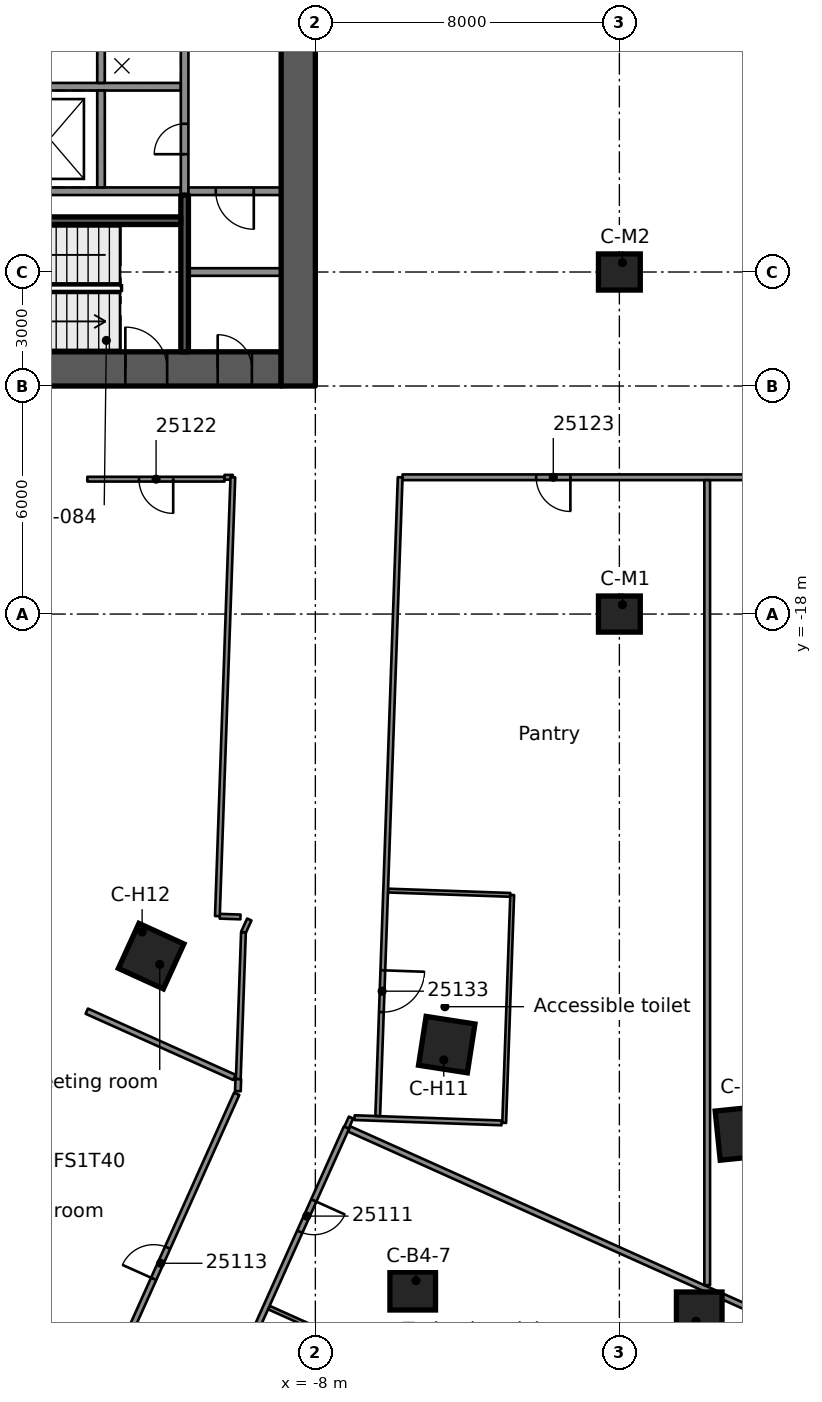
"""IFC4 building model, lengths in metres.
Left out: names, types, materials, properties, quantities, classifications, styles, units other than length and angle.
Written with IfcOpenShell. Run it as: python <this file> out.ifc"""

import sys

from ifc_helpers import new_model, si_unit, direction, frame, frame_2d, origin, origin_2d, place, context, subcontext, project, spatial, rectangle, extrude, element, fill, save


model = new_model("IFC4")
c1 = context("Model", 3, precision=1e-05, world=origin(), true_north=direction((0.0, 1.0)))
c2 = subcontext(c1, "Body", "Model", "MODEL_VIEW")
j1 = project(units=[si_unit("LENGTHUNIT", "METRE"), si_unit("PLANEANGLEUNIT", "RADIAN")], contexts=[c1])
p1 = place(None, origin())
s1 = spatial("IfcSite", under=j1, at=p1, CompositionType="ELEMENT")
p2 = place(p1, origin())
s2 = spatial("IfcBuilding", under=s1, at=p2, CompositionType="ELEMENT")
p3 = place(p2, frame((0.0, 0.0, 127.2)))
s3 = spatial("IfcBuildingStorey", under=s2, at=p3, CompositionType="ELEMENT", Elevation=127.2)
p4 = place(p3, frame((-18.1, -11.55, 0.0), z_axis=(0.0, 0.0, 1.0), x_axis=(1.0, 0.0, 0.0)))
e1 = element("IfcWall", 1, at=p4, inside=s3, PredefinedType="SHEAR", context=c2, shape_type="SweptSolid", body=[
    extrude(rectangle(XDim=9.2, YDim=0.9, at=frame_2d((4.6, 0.0))), origin(), (0.0, 0.0, 1.0), 3.5),
])
p5 = place(p4, frame((5.1, 0.0, 0.0)))
e2 = element("IfcOpeningElement", 2, at=p5, cuts=e1, PredefinedType="OPENING", context=c2, shape_type="SweptSolid", body=[
    extrude(rectangle(XDim=1.1, YDim=2.1, at=frame_2d((0.55, 1.05))), frame((0.0, 0.46, 0.0), z_axis=(0.0, -1.0, 0.0), x_axis=(1.0, 0.0, 0.0)), (0.0, 0.0, 1.0), 0.92),
])
p6 = place(p4, frame((7.53, 0.0, 0.0)))
e3 = element("IfcOpeningElement", 3, at=p6, cuts=e1, PredefinedType="OPENING", context=c2, shape_type="SweptSolid", body=[
    extrude(rectangle(XDim=0.9, YDim=2.1, at=frame_2d((0.45, 1.05))), frame((0.0, 0.46, 0.0), z_axis=(0.0, -1.0, 0.0), x_axis=(1.0, 0.0, 0.0)), (0.0, 0.0, 1.0), 0.92),
])
p7 = place(p3, frame((-8.45, -12.0, 0.0), z_axis=(0.0, 0.0, 1.0), x_axis=(0.0, 1.0, 0.0)))
e4 = element("IfcWall", 4, at=p7, inside=s3, PredefinedType="SHEAR", context=c2, shape_type="SweptSolid", body=[
    extrude(rectangle(XDim=24.0, YDim=0.9, at=frame_2d((12.0, 0.0))), origin(), (0.0, 0.0, 1.0), 3.5),
])
p8 = place(p7, frame((9.6, 0.0, 0.0)))
e5 = element("IfcOpeningElement", 5, at=p8, cuts=e4, PredefinedType="OPENING", context=c2, shape_type="SweptSolid", body=[
    extrude(rectangle(XDim=1.8, YDim=2.1, at=frame_2d((0.9, 1.05))), frame((0.0, 0.46, 0.0), z_axis=(0.0, -1.0, 0.0), x_axis=(1.0, 0.0, 0.0)), (0.0, 0.0, 1.0), 0.92),
])
p9 = place(p7, frame((19.65, 0.0, 0.0)))
e6 = element("IfcOpeningElement", 6, at=p9, cuts=e4, PredefinedType="OPENING", context=c2, shape_type="SweptSolid", body=[
    extrude(rectangle(XDim=1.1, YDim=2.1, at=frame_2d((0.55, 1.05))), frame((0.0, 0.46, 0.0), z_axis=(0.0, -1.0, 0.0), x_axis=(1.0, 0.0, 0.0)), (0.0, 0.0, 1.0), 0.92),
])
for number, where, z_axis, x_axis in (
    (7, (-5.438, -35.812, 0.0), (0.0, 0.0, 1.0), (1.0, 0.0, 0.0)),
    (8, (2.101, -36.338, 0.0), (0.0, 0.0, 1.0), (1.0, 0.0, 0.0)),
):
    element("IfcColumn", number, at=place(p3, frame(where, z_axis=z_axis, x_axis=x_axis)), inside=s3, PredefinedType="COLUMN", context=c2, shape_type="SweptSolid", body=[
        extrude(rectangle(XDim=1.2, YDim=1.0, at=origin_2d()), origin(), (0.0, 0.0, 1.0), 3.5),
    ])
for number, where, z_axis, x_axis in (
    (9, (3.234, -31.658, 0.0), (0.0, 0.0, 1.0), (0.102, -0.995, 0.0)),
    (10, (-4.543, -29.329, 0.0), (0.0, 0.0, 1.0), (-0.153, -0.988, 0.0)),
    (11, (-12.321, -27.001, 0.0), (0.0, 0.0, 1.0), (-0.415, -0.91, 0.0)),
):
    element("IfcColumn", number, at=place(p3, frame(where, z_axis=z_axis, x_axis=x_axis)), inside=s3, PredefinedType="COLUMN", context=c2, shape_type="SweptSolid", body=[
        extrude(rectangle(XDim=1.3, YDim=1.3, at=origin_2d()), origin(), (0.0, 0.0, 1.0), 3.5),
    ])
for number, where, z_axis, x_axis in (
    (12, (0.0, -18.0, 0.0), (0.0, 0.0, 1.0), (1.0, 0.0, 0.0)),
    (13, (0.0, -9.0, 0.0), (0.0, 0.0, 1.0), (1.0, 0.0, 0.0)),
):
    element("IfcColumn", number, at=place(p3, frame(where, z_axis=z_axis, x_axis=x_axis)), inside=s3, PredefinedType="COLUMN", context=c2, shape_type="SweptSolid", body=[
        extrude(rectangle(XDim=1.1, YDim=0.95, at=origin_2d()), origin(), (0.0, 0.0, 1.0), 3.5),
    ])
p10 = place(p3, frame((-11.54, -6.875, 0.0), z_axis=(0.0, 0.0, 1.0), x_axis=(-1.0, 0.0, 0.0)))
e14 = element("IfcWall", 14, at=p10, inside=s3, PredefinedType="SOLIDWALL", context=c2, shape_type="SweptSolid", body=[
    extrude(rectangle(XDim=6.56, YDim=0.2, at=frame_2d((3.28, 0.0))), origin(), (0.0, 0.0, 1.0), 3.09),
])
p11 = place(p3, frame((-11.54, -4.125, 0.0), z_axis=(0.0, 0.0, 1.0), x_axis=(-1.0, 0.0, 0.0)))
e15 = element("IfcWall", 15, at=p11, inside=s3, PredefinedType="SOLIDWALL", context=c2, shape_type="SweptSolid", body=[
    extrude(rectangle(XDim=4.7, YDim=0.2, at=frame_2d((2.35, 0.0))), origin(), (0.0, 0.0, 1.0), 3.09),
])
p12 = place(p3, frame((-11.44, -6.975, 0.0), z_axis=(0.0, 0.0, 1.0), x_axis=(0.0, 1.0, 0.0)))
e16 = element("IfcWall", 16, at=p12, inside=s3, PredefinedType="SOLIDWALL", context=c2, shape_type="SweptSolid", body=[
    extrude(rectangle(XDim=13.95, YDim=0.2, at=frame_2d((6.975, 0.0))), origin(), (0.0, 0.0, 1.0), 3.09),
])
p13 = place(p12, frame((6.425, 0.0, 0.0)))
e17 = element("IfcOpeningElement", 17, at=p13, cuts=e16, PredefinedType="OPENING", context=c2, shape_type="SweptSolid", body=[
    extrude(rectangle(XDim=1.1, YDim=2.1, at=frame_2d((0.55, 1.05))), frame((0.0, 0.11, 0.0), z_axis=(0.0, -1.0, 0.0), x_axis=(1.0, 0.0, 0.0)), (0.0, 0.0, 1.0), 0.22),
])
p14 = place(p12, frame((9.175, 0.0, 0.0)))
e18 = element("IfcOpeningElement", 18, at=p14, cuts=e16, PredefinedType="OPENING", context=c2, shape_type="SweptSolid", body=[
    extrude(rectangle(XDim=1.1, YDim=2.1, at=frame_2d((0.55, 1.05))), frame((0.0, 0.11, 0.0), z_axis=(0.0, -1.0, 0.0), x_axis=(1.0, 0.0, 0.0)), (0.0, 0.0, 1.0), 0.22),
])
p15 = place(p12, frame((11.925, 0.0, 0.0)))
e19 = element("IfcOpeningElement", 19, at=p15, cuts=e16, PredefinedType="OPENING", context=c2, shape_type="SweptSolid", body=[
    extrude(rectangle(XDim=1.1, YDim=2.1, at=frame_2d((0.55, 1.05))), frame((0.0, 0.11, 0.0), z_axis=(0.0, -1.0, 0.0), x_axis=(1.0, 0.0, 0.0)), (0.0, 0.0, 1.0), 0.22),
])
p16 = place(p12, frame((1.075, 0.0, 0.0)))
e20 = element("IfcOpeningElement", 20, at=p16, cuts=e16, PredefinedType="OPENING", context=c2, shape_type="SweptSolid", body=[
    extrude(rectangle(XDim=0.8, YDim=2.1, at=frame_2d((0.4, 1.05))), frame((0.0, 0.11, 0.0), z_axis=(0.0, -1.0, 0.0), x_axis=(1.0, 0.0, 0.0)), (0.0, 0.0, 1.0), 0.22),
])
for number, where, z_axis, x_axis in (
    (21, (-13.64, -6.775, 0.0), (0.0, 0.0, 1.0), (0.0, 1.0, 0.0)),
    (22, (-13.64, -4.025, 0.0), (0.0, 0.0, 1.0), (0.0, 1.0, 0.0)),
):
    element("IfcWall", number, at=place(p3, frame(where, z_axis=z_axis, x_axis=x_axis)), inside=s3, PredefinedType="SOLIDWALL", context=c2, shape_type="SweptSolid", body=[
        extrude(rectangle(XDim=2.55, YDim=0.2, at=frame_2d((1.275, 0.0))), origin(), (0.0, 0.0, 1.0), 3.09),
    ])
p17 = place(p3, frame((-11.44, -11.1, 0.0), z_axis=(0.0, 0.0, 1.0), x_axis=(0.0, 1.0, 0.0)))
e23 = element("IfcWall", 23, at=p17, inside=s3, PredefinedType="SOLIDWALL", context=c2, shape_type="SweptSolid", body=[
    extrude(rectangle(XDim=4.125, YDim=0.2, at=frame_2d((2.062, 0.0))), origin(), (0.0, 0.0, 1.0), 3.09),
])
p18 = place(p3, frame((-11.54, -7.65, 0.0), z_axis=(0.0, 0.0, 1.0), x_axis=(-1.0, 0.0, 0.0)))
e24 = element("IfcWall", 24, at=p18, inside=s3, PredefinedType="SOLIDWALL", context=c2, shape_type="SweptSolid", body=[
    extrude(rectangle(XDim=6.56, YDim=0.2, at=frame_2d((3.28, 0.0))), origin(), (0.0, 0.0, 1.0), 3.09),
])
p19 = place(p3, frame((-8.9, -6.875, 0.0), z_axis=(0.0, 0.0, 1.0), x_axis=(-1.0, 0.0, 0.0)))
e25 = element("IfcWall", 25, at=p19, inside=s3, PredefinedType="PARTITIONING", context=c2, shape_type="SweptSolid", body=[
    extrude(rectangle(XDim=2.44, YDim=0.2, at=frame_2d((1.22, 0.0))), origin(), (0.0, 0.0, 1.0), 3.09),
])
p20 = place(p19, frame((0.72, 0.0, 0.0)))
e26 = element("IfcOpeningElement", 26, at=p20, cuts=e25, PredefinedType="OPENING", context=c2, shape_type="SweptSolid", body=[
    extrude(rectangle(XDim=1.0, YDim=2.1, at=frame_2d((0.5, 1.05))), frame((0.0, 0.11, 0.0), z_axis=(0.0, -1.0, 0.0), x_axis=(1.0, 0.0, 0.0)), (0.0, 0.0, 1.0), 0.22),
])
p21 = place(p3, frame((-8.9, -9.0, 0.0), z_axis=(0.0, 0.0, 1.0), x_axis=(-1.0, 0.0, 0.0)))
e27 = element("IfcWall", 27, at=p21, inside=s3, PredefinedType="PARTITIONING", context=c2, shape_type="SweptSolid", body=[
    extrude(rectangle(XDim=2.44, YDim=0.2, at=frame_2d((1.22, 0.0))), origin(), (0.0, 0.0, 1.0), 3.09),
])
p22 = place(p3, frame((-9.223, -36.248, 0.0), z_axis=(0.0, 0.0, 1.0), x_axis=(0.912391093054, -0.409319549149, 0.0)))
e28 = element("IfcWall", 28, at=p22, inside=s3, PredefinedType="PARTITIONING", context=c2, shape_type="SweptSolid", body=[
    extrude(rectangle(XDim=13.825, YDim=0.1, at=frame_2d((6.913, 0.0))), origin(), (0.0, 0.0, 1.0), 3.08),
])
p23 = place(p3, frame((-14.015, -28.449, 0.0), z_axis=(0.0, 0.0, 1.0), x_axis=(0.912389731209, -0.409322584748, 0.0)))
e29 = element("IfcWall", 29, at=p23, inside=s3, PredefinedType="PARTITIONING", context=c2, shape_type="SweptSolid", body=[
    extrude(rectangle(XDim=4.258, YDim=0.15, at=frame_2d((2.129, 0.0))), origin(), (0.0, 0.0, 1.0), 3.08),
])
p24 = place(p3, frame((-7.113, -31.546, 0.0), z_axis=(0.0, 0.0, 1.0), x_axis=(0.912346277005, -0.409419431432, 0.0)))
e30 = element("IfcWall", 30, at=p24, inside=s3, PredefinedType="PARTITIONING", context=c2, shape_type="SweptSolid", body=[
    extrude(rectangle(XDim=13.825, YDim=0.15, at=frame_2d((6.913, 0.0))), origin(), (0.0, 0.0, 1.0), 3.08),
])
p25 = place(p3, frame((-6.968, -31.251, 0.0), z_axis=(0.0, 0.0, 1.0), x_axis=(0.99936470119, -0.035639781365, 0.0)))
e31 = element("IfcWall", 31, at=p25, inside=s3, PredefinedType="PARTITIONING", context=c2, shape_type="SweptSolid", body=[
    extrude(rectangle(XDim=3.87, YDim=0.125, at=frame_2d((1.935, 0.0))), origin(), (0.0, 0.0, 1.0), 3.08),
])
p26 = place(p3, frame((-10.515, -25.951, 0.0), z_axis=(0.0, 0.0, 1.0), x_axis=(0.999387748514, -0.034987542363, 0.0)))
e32 = element("IfcWall", 32, at=p26, inside=s3, PredefinedType="PARTITIONING", context=c2, shape_type="SweptSolid", body=[
    extrude(rectangle(XDim=0.544, YDim=0.125, at=frame_2d((0.272, 0.0))), origin(), (0.0, 0.0, 1.0), 3.08),
])
p27 = place(p3, frame((-6.088, -25.276, 0.0), z_axis=(0.0, 0.0, 1.0), x_axis=(0.999383173756, -0.035117972788, 0.0)))
e33 = element("IfcWall", 33, at=p27, inside=s3, PredefinedType="PARTITIONING", context=c2, shape_type="SweptSolid", body=[
    extrude(rectangle(XDim=3.219, YDim=0.1, at=frame_2d((1.609, 0.0))), origin(), (0.0, 0.0, 1.0), 3.08),
])
p28 = place(p3, frame((-10.391, -14.451, 0.0), z_axis=(0.0, 0.0, 1.0), x_axis=(-1.0, 0.0, 0.0)))
e34 = element("IfcWall", 34, at=p28, inside=s3, PredefinedType="PARTITIONING", context=c2, shape_type="SweptSolid", body=[
    extrude(rectangle(XDim=3.609, YDim=0.125, at=frame_2d((1.804, 0.0))), origin(), (0.0, 0.0, 1.0), 3.08),
])
p29 = place(p28, frame((1.35, 0.0, 0.0)))
e35 = element("IfcOpeningElement", 35, at=p29, cuts=e34, PredefinedType="OPENING", context=c2, shape_type="SweptSolid", body=[
    extrude(rectangle(XDim=0.9, YDim=2.1, at=frame_2d((0.45, 1.05))), frame((0.0, 0.073, 0.0), z_axis=(0.0, -1.0, 0.0), x_axis=(1.0, 0.0, 0.0)), (0.0, 0.0, 1.0), 0.145),
])
p30 = place(p3, frame((-10.39, -14.401, 0.0), z_axis=(0.0, 0.0, 1.0), x_axis=(1.0, 0.0, 0.0)))
e36 = element("IfcWall", 36, at=p30, inside=s3, PredefinedType="PARTITIONING", context=c2, shape_type="SweptSolid", body=[
    extrude(rectangle(XDim=0.219, YDim=0.125, at=frame_2d((0.109, 0.0))), origin(), (0.0, 0.0, 1.0), 3.08),
])
p31 = place(p3, frame((10.391, -14.401, 0.0), z_axis=(0.0, 0.0, 1.0), x_axis=(-1.0, 0.0, 0.0)))
e37 = element("IfcWall", 37, at=p31, inside=s3, PredefinedType="PARTITIONING", context=c2, shape_type="SweptSolid", body=[
    extrude(rectangle(XDim=16.096, YDim=0.15, at=frame_2d((8.048, 0.0))), origin(), (0.0, 0.0, 1.0), 3.08),
])
p32 = place(p31, frame((11.68, 0.0, 0.0)))
e38 = element("IfcOpeningElement", 38, at=p32, cuts=e37, PredefinedType="OPENING", context=c2, shape_type="SweptSolid", body=[
    extrude(rectangle(XDim=0.9, YDim=2.1, at=frame_2d((0.45, 1.05))), frame((0.0, 0.085, 0.0), z_axis=(0.0, -1.0, 0.0), x_axis=(1.0, 0.0, 0.0)), (0.0, 0.0, 1.0), 0.17),
])
p33 = place(p31, frame((3.6, 0.0, 0.0)))
e39 = element("IfcOpeningElement", 39, at=p33, cuts=e37, PredefinedType="OPENING", context=c2, shape_type="SweptSolid", body=[
    extrude(rectangle(XDim=0.9, YDim=2.1, at=frame_2d((0.45, 1.05))), frame((0.0, 0.085, 0.0), z_axis=(0.0, -1.0, 0.0), x_axis=(1.0, 0.0, 0.0)), (0.0, 0.0, 1.0), 0.17),
])
p34 = place(p3, frame((-9.892, -26.374, 0.0), z_axis=(0.0, 0.0, 1.0), x_axis=(0.415837630043, 0.909438873944, 0.0)))
e40 = element("IfcWall", 40, at=p34, inside=s3, PredefinedType="PARTITIONING", context=c2, shape_type="SweptSolid", body=[
    extrude(rectangle(XDim=0.37, YDim=0.125, at=frame_2d((0.185, 0.0))), origin(), (0.0, 0.0, 1.0), 3.08),
])
p35 = place(p3, frame((-7.181, -31.515, 0.0), z_axis=(0.0, 0.0, 1.0), x_axis=(0.409774665578, 0.912186781011, 0.0)))
e41 = element("IfcWall", 41, at=p35, inside=s3, PredefinedType="PARTITIONING", context=c2, shape_type="SweptSolid", body=[
    extrude(rectangle(XDim=0.292, YDim=0.125, at=frame_2d((0.146, 0.0))), origin(), (0.0, 0.0, 1.0), 3.08),
])
p36 = place(p3, frame((-7.182, -31.514, 0.0), z_axis=(0.0, 0.0, 1.0), x_axis=(-0.409349192906, -0.912377793607, 0.0)))
e42 = element("IfcWall", 42, at=p36, inside=s3, PredefinedType="PARTITIONING", context=c2, shape_type="SweptSolid", body=[
    extrude(rectangle(XDim=24.808, YDim=0.15, at=frame_2d((12.404, 0.0))), origin(), (0.0, 0.0, 1.0), 3.08),
])
p37 = place(p36, frame((2.101, 0.0, 0.0)))
e43 = element("IfcOpeningElement", 43, at=p37, cuts=e42, PredefinedType="OPENING", context=c2, shape_type="SweptSolid", body=[
    extrude(rectangle(XDim=0.9, YDim=2.1, at=frame_2d((0.45, 1.05))), frame((0.0, 0.085, 0.0), z_axis=(0.0, -1.0, 0.0), x_axis=(1.0, 0.0, 0.0)), (0.0, 0.0, 1.0), 0.17),
])
p38 = place(p36, frame((7.254, 0.0, 0.0)))
e44 = element("IfcOpeningElement", 44, at=p38, cuts=e42, PredefinedType="OPENING", context=c2, shape_type="SweptSolid", body=[
    extrude(rectangle(XDim=0.9, YDim=2.1, at=frame_2d((0.45, 1.05))), frame((0.0, 0.085, 0.0), z_axis=(0.0, -1.0, 0.0), x_axis=(1.0, 0.0, 0.0)), (0.0, 0.0, 1.0), 0.17),
])
p39 = place(p36, frame((13.408, 0.0, 0.0)))
e45 = element("IfcOpeningElement", 45, at=p39, cuts=e42, PredefinedType="OPENING", context=c2, shape_type="SweptSolid", body=[
    extrude(rectangle(XDim=0.9, YDim=2.1, at=frame_2d((0.45, 1.05))), frame((0.0, 0.085, 0.0), z_axis=(0.0, -1.0, 0.0), x_axis=(1.0, 0.0, 0.0)), (0.0, 0.0, 1.0), 0.17),
])
p40 = place(p3, frame((-18.846, -50.182, 0.0), z_axis=(0.0, 0.0, 1.0), x_axis=(0.409371431607, 0.912367815622, 0.0)))
e46 = element("IfcWall", 46, at=p40, inside=s3, PredefinedType="PARTITIONING", context=c2, shape_type="SweptSolid", body=[
    extrude(rectangle(XDim=21.438, YDim=0.15, at=frame_2d((10.719, 0.0))), origin(), (0.0, 0.0, 1.0), 3.08),
])
p41 = place(p40, frame((16.1, 0.0, 0.0)))
e47 = element("IfcOpeningElement", 47, at=p41, cuts=e46, PredefinedType="OPENING", context=c2, shape_type="SweptSolid", body=[
    extrude(rectangle(XDim=0.9, YDim=2.1, at=frame_2d((0.45, 1.05))), frame((0.0, 0.085, 0.0), z_axis=(0.0, -1.0, 0.0), x_axis=(1.0, 0.0, 0.0)), (0.0, 0.0, 1.0), 0.17),
])
p42 = place(p40, frame((5.35, 0.0, 0.0)))
e48 = element("IfcOpeningElement", 48, at=p42, cuts=e46, PredefinedType="OPENING", context=c2, shape_type="SweptSolid", body=[
    extrude(rectangle(XDim=0.9, YDim=2.1, at=frame_2d((0.45, 1.05))), frame((0.0, 0.085, 0.0), z_axis=(0.0, -1.0, 0.0), x_axis=(1.0, 0.0, 0.0)), (0.0, 0.0, 1.0), 0.17),
])
p43 = place(p3, frame((-3.031, -31.388, 0.0), z_axis=(0.0, 0.0, 1.0), x_axis=(0.035158834676, 0.999381737048, 0.0)))
e49 = element("IfcWall", 49, at=p43, inside=s3, PredefinedType="PARTITIONING", context=c2, shape_type="SweptSolid", body=[
    extrude(rectangle(XDim=6.0, YDim=0.1, at=frame_2d((3.0, 0.0))), origin(), (0.0, 0.0, 1.0), 3.08),
])
p44 = place(p3, frame((-5.768, -14.401, 0.0), z_axis=(0.0, 0.0, 1.0), x_axis=(-0.035129220635, -0.999382778448, 0.0)))
e50 = element("IfcWall", 50, at=p44, inside=s3, PredefinedType="PARTITIONING", context=c2, shape_type="SweptSolid", body=[
    extrude(rectangle(XDim=16.819, YDim=0.125, at=frame_2d((8.409, 0.0))), origin(), (0.0, 0.0, 1.0), 3.08),
])
p45 = place(p44, frame((12.981, 0.0, 0.0)))
e51 = element("IfcOpeningElement", 51, at=p45, cuts=e50, PredefinedType="OPENING", context=c2, shape_type="SweptSolid", body=[
    extrude(rectangle(XDim=1.1, YDim=2.1, at=frame_2d((0.55, 1.05))), frame((0.0, 0.073, 0.0), z_axis=(0.0, -1.0, 0.0), x_axis=(1.0, 0.0, 0.0)), (0.0, 0.0, 1.0), 0.145),
])
p46 = place(p3, frame((-10.028, -30.238, 0.0), z_axis=(0.0, 0.0, 1.0), x_axis=(0.03517125066, 0.999381300169, 0.0)))
e52 = element("IfcWall", 52, at=p46, inside=s3, PredefinedType="PARTITIONING", context=c2, shape_type="SweptSolid", body=[
    extrude(rectangle(XDim=3.866, YDim=0.125, at=frame_2d((1.933, 0.0))), origin(), (0.0, 0.0, 1.0), 3.08),
])
p47 = place(p3, frame((-10.039, -30.555, 0.0), z_axis=(0.0, 0.0, 1.0), x_axis=(0.034647905353, 0.999399581076, 0.0)))
e53 = element("IfcWall", 53, at=p47, inside=s3, PredefinedType="PARTITIONING", context=c2, shape_type="SweptSolid", body=[
    extrude(rectangle(XDim=0.317, YDim=0.15, at=frame_2d((0.159, 0.0))), origin(), (0.0, 0.0, 1.0), 3.08),
])
p48 = place(p3, frame((-10.578, -25.948, 0.0), z_axis=(0.0, 0.0, 1.0), x_axis=(0.035223493249, 0.999379460227, 0.0)))
e54 = element("IfcWall", 54, at=p48, inside=s3, PredefinedType="PARTITIONING", context=c2, shape_type="SweptSolid", body=[
    extrude(rectangle(XDim=11.554, YDim=0.125, at=frame_2d((5.777, 0.0))), origin(), (0.0, 0.0, 1.0), 3.08),
])
p49 = place(p3, frame((2.311, -35.659, 0.0), z_axis=(0.0, 0.0, 1.0), x_axis=(0.0, 1.0, 0.0)))
e55 = element("IfcWall", 55, at=p49, inside=s3, PredefinedType="PARTITIONING", context=c2, shape_type="SweptSolid", body=[
    extrude(rectangle(XDim=21.183, YDim=0.15, at=frame_2d((10.591, 0.0))), origin(), (0.0, 0.0, 1.0), 3.08),
])
p50 = place(p16, origin())
e56 = element("IfcDoor", 56, at=p50, inside=s3, OperationType="SINGLE_SWING_LEFT", PredefinedType="DOOR", context=c2, shape_type="SweptSolid", body=[
    extrude(rectangle(XDim=0.8, YDim=2.1, at=frame_2d((0.4, 1.05))), frame((0.0, 0.025, 0.0), z_axis=(0.0, -1.0, 0.0), x_axis=(1.0, 0.0, 0.0)), (0.0, 0.0, 1.0), 0.05),
])
fill(e20, e56)
p51 = place(p5, origin())
e57 = element("IfcDoor", 57, at=p51, inside=s3, OperationType="SINGLE_SWING_RIGHT", PredefinedType="DOOR", context=c2, shape_type="SweptSolid", body=[
    extrude(rectangle(XDim=1.1, YDim=2.1, at=frame_2d((0.55, 1.05))), frame((0.0, 0.025, 0.0), z_axis=(0.0, -1.0, 0.0), x_axis=(1.0, 0.0, 0.0)), (0.0, 0.0, 1.0), 0.05),
])
fill(e2, e57)
p52 = place(p6, origin())
e58 = element("IfcDoor", 58, at=p52, inside=s3, OperationType="SINGLE_SWING_RIGHT", PredefinedType="DOOR", context=c2, shape_type="SweptSolid", body=[
    extrude(rectangle(XDim=0.9, YDim=2.1, at=frame_2d((0.45, 1.05))), frame((0.0, 0.025, 0.0), z_axis=(0.0, -1.0, 0.0), x_axis=(1.0, 0.0, 0.0)), (0.0, 0.0, 1.0), 0.05),
])
fill(e3, e58)
p53 = place(p20, origin())
e59 = element("IfcDoor", 59, at=p53, inside=s3, OperationType="SINGLE_SWING_RIGHT", PredefinedType="DOOR", context=c2, shape_type="SweptSolid", body=[
    extrude(rectangle(XDim=1.0, YDim=2.1, at=frame_2d((0.5, 1.05))), frame((0.0, 0.025, 0.0), z_axis=(0.0, -1.0, 0.0), x_axis=(1.0, 0.0, 0.0)), (0.0, 0.0, 1.0), 0.05),
])
fill(e26, e59)
p54 = place(p37, origin())
e60 = element("IfcDoor", 60, at=p54, inside=s3, OperationType="SINGLE_SWING_LEFT", PredefinedType="DOOR", context=c2, shape_type="SweptSolid", body=[
    extrude(rectangle(XDim=0.9, YDim=2.1, at=frame_2d((0.45, 1.05))), frame((0.0, 0.025, 0.0), z_axis=(0.0, -1.0, 0.0), x_axis=(1.0, 0.0, 0.0)), (0.0, 0.0, 1.0), 0.05),
])
fill(e43, e60)
p55 = place(p41, origin())
e61 = element("IfcDoor", 61, at=p55, inside=s3, OperationType="SINGLE_SWING_RIGHT", PredefinedType="DOOR", context=c2, shape_type="SweptSolid", body=[
    extrude(rectangle(XDim=0.9, YDim=2.1, at=frame_2d((0.45, 1.05))), frame((0.0, 0.025, 0.0), z_axis=(0.0, -1.0, 0.0), x_axis=(1.0, 0.0, 0.0)), (0.0, 0.0, 1.0), 0.05),
])
fill(e47, e61)
p56 = place(p29, origin())
e62 = element("IfcDoor", 62, at=p56, inside=s3, OperationType="SINGLE_SWING_LEFT", PredefinedType="DOOR", context=c2, shape_type="SweptSolid", body=[
    extrude(rectangle(XDim=0.9, YDim=2.1, at=frame_2d((0.45, 1.05))), frame((0.0, 0.025, 0.0), z_axis=(0.0, -1.0, 0.0), x_axis=(1.0, 0.0, 0.0)), (0.0, 0.0, 1.0), 0.05),
])
fill(e35, e62)
p57 = place(p32, origin())
e63 = element("IfcDoor", 63, at=p57, inside=s3, OperationType="SINGLE_SWING_RIGHT", PredefinedType="DOOR", context=c2, shape_type="SweptSolid", body=[
    extrude(rectangle(XDim=0.9, YDim=2.1, at=frame_2d((0.45, 1.05))), frame((0.0, 0.025, 0.0), z_axis=(0.0, -1.0, 0.0), x_axis=(1.0, 0.0, 0.0)), (0.0, 0.0, 1.0), 0.05),
])
fill(e38, e63)
p58 = place(p45, origin())
e64 = element("IfcDoor", 64, at=p58, inside=s3, OperationType="SINGLE_SWING_RIGHT", PredefinedType="DOOR", context=c2, shape_type="SweptSolid", body=[
    extrude(rectangle(XDim=1.1, YDim=2.1, at=frame_2d((0.55, 1.05))), frame((0.0, 0.025, 0.0), z_axis=(0.0, -1.0, 0.0), x_axis=(1.0, 0.0, 0.0)), (0.0, 0.0, 1.0), 0.05),
])
fill(e51, e64)
save(model, sys.argv[1])
